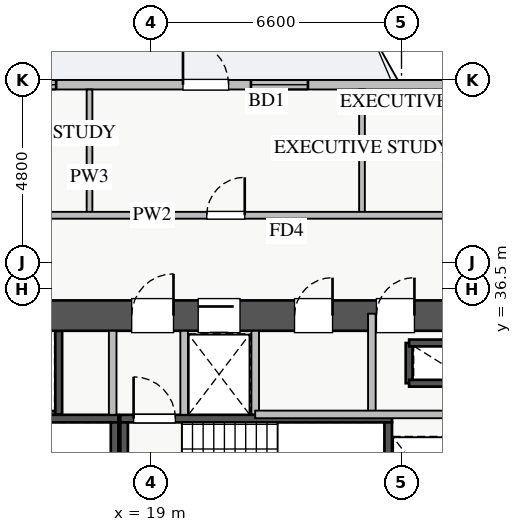
"""IFC4 building model, lengths in metres.
Left out: names, types, materials, properties, quantities, classifications, styles, units other than length and angle.
Written with IfcOpenShell. Run it as: python <this file> out.ifc"""

import sys

from ifc_helpers import new_model, si_unit, direction, frame, frame_2d, origin, place, context, subcontext, project, spatial, rectangle, extrude, source, transform, mapped, element, fill, save


model = new_model("IFC4")
c1 = context("Model", 3, precision=1e-05, world=origin(), true_north=direction((0.0, 1.0)))
c2 = subcontext(c1, "Body", "Model", "MODEL_VIEW")
j1 = project(units=[si_unit("LENGTHUNIT", "METRE"), si_unit("PLANEANGLEUNIT", "RADIAN")], contexts=[c1])
p1 = place(None, origin())
s1 = spatial("IfcSite", under=j1, at=p1, CompositionType="ELEMENT")
p2 = place(p1, origin())
s2 = spatial("IfcBuilding", under=s1, at=p2, CompositionType="ELEMENT")
p3 = place(p2, frame((0.0, 0.0, 36.0)))
s3 = spatial("IfcBuildingStorey", under=s2, at=p3, CompositionType="ELEMENT", Elevation=36.0)
p4 = place(p3, frame((25.8, 34.02, 0.0), z_axis=(0.0, 0.0, 1.0), x_axis=(0.0, 1.0, 0.0)))
e1 = element("IfcWall", 1, at=p4, inside=s3, PredefinedType="SHEAR", context=c2, shape_type="SweptSolid", body=[
    extrude(rectangle(XDim=1.06, YDim=0.18, at=frame_2d((0.53, 0.0))), origin(), (0.0, 0.0, 1.0), 3.07),
])
for number, where, z_axis, x_axis in (
    (2, (25.8, 35.08, 0.0), (0.0, 0.0, 1.0), (1.0, 0.0, 0.0)),
    (3, (25.8, 34.02, 0.0), (0.0, 0.0, 1.0), (1.0, 0.0, 0.0)),
):
    element("IfcWall", number, at=place(p3, frame(where, z_axis=z_axis, x_axis=x_axis)), inside=s3, PredefinedType="SHEAR", context=c2, shape_type="SweptSolid", body=[
        extrude(rectangle(XDim=1.2, YDim=0.18, at=frame_2d((0.6, 0.0))), origin(), (0.0, 0.0, 1.0), 3.07),
    ])
p5 = place(p3, frame((14.62, 33.2, 0.0), z_axis=(0.0, 0.0, 1.0), x_axis=(1.0, 0.0, 0.0)))
e4 = element("IfcWall", 4, at=p5, inside=s3, PredefinedType="SHEAR", context=c2, shape_type="SweptSolid", body=[
    extrude(rectangle(XDim=1.96, YDim=0.18, at=frame_2d((0.98, 0.0))), origin(), (0.0, 0.0, 1.0), 3.07),
])
p6 = place(p3, frame((16.58, 33.2, 0.0), z_axis=(0.0, 0.0, 1.0), x_axis=(0.0, 1.0, 0.0)))
e5 = element("IfcWall", 5, at=p6, inside=s3, PredefinedType="SHEAR", context=c2, shape_type="SweptSolid", body=[
    extrude(rectangle(XDim=2.2, YDim=0.18, at=frame_2d((1.1, 0.0))), origin(), (0.0, 0.0, 1.0), 3.07),
])
p7 = place(p3, frame((19.88, 33.2, 0.0), z_axis=(0.0, 0.0, 1.0), x_axis=(1.0, 0.0, 0.0)))
e6 = element("IfcWall", 6, at=p7, inside=s3, PredefinedType="SHEAR", context=c2, shape_type="SweptSolid", body=[
    extrude(rectangle(XDim=1.87, YDim=0.18, at=frame_2d((0.935, 0.0))), origin(), (0.0, 0.0, 1.0), 3.07),
])
p8 = place(p3, frame((11.0, 33.09, 0.0), z_axis=(0.0, 0.0, 1.0), x_axis=(1.0, 0.0, 0.0)))
e7 = element("IfcWall", 7, at=p8, inside=s3, PredefinedType="SHEAR", context=c2, shape_type="SweptSolid", body=[
    extrude(rectangle(XDim=7.15, YDim=0.2, at=frame_2d((3.575, 0.0))), origin(), (0.0, 0.0, 1.0), 3.25),
])
p9 = place(p8, frame((0.35, 0.0, 0.0)))
e8 = element("IfcOpeningElement", 8, at=p9, cuts=e7, PredefinedType="OPENING", context=c2, shape_type="SweptSolid", body=[
    extrude(rectangle(XDim=1.1, YDim=2.05, at=frame_2d((0.55, 1.025))), frame((0.0, 0.11, 0.0), z_axis=(0.0, -1.0, 0.0), x_axis=(1.0, 0.0, 0.0)), (0.0, 0.0, 1.0), 0.22),
])
p10 = place(p3, frame((18.05, 30.05, 0.0), z_axis=(0.0, 0.0, 1.0), x_axis=(0.0, 1.0, 0.0)))
e9 = element("IfcWall", 9, at=p10, inside=s3, PredefinedType="SHEAR", context=c2, shape_type="SweptSolid", body=[
    extrude(rectangle(XDim=2.94, YDim=0.2, at=frame_2d((1.47, 0.0))), origin(), (0.0, 0.0, 1.0), 3.25),
])
p11 = place(p3, frame((18.2, 33.09, 0.0), z_axis=(0.0, 0.0, 1.0), x_axis=(1.0, 0.0, 0.0)))
e10 = element("IfcWall", 10, at=p11, inside=s3, PredefinedType="SHEAR", context=c2, shape_type="SweptSolid", body=[
    extrude(rectangle(XDim=7.15, YDim=0.2, at=frame_2d((3.575, 0.0))), origin(), (0.0, 0.0, 1.0), 3.25),
])
p12 = place(p11, frame((0.35, 0.0, 0.0)))
e11 = element("IfcOpeningElement", 11, at=p12, cuts=e10, PredefinedType="OPENING", context=c2, shape_type="SweptSolid", body=[
    extrude(rectangle(XDim=1.1, YDim=2.05, at=frame_2d((0.55, 1.025))), frame((0.0, 0.11, 0.0), z_axis=(0.0, -1.0, 0.0), x_axis=(1.0, 0.0, 0.0)), (0.0, 0.0, 1.0), 0.22),
])
for number, where, z_axis, x_axis in (
    (12, (18.3, 30.05, 0.0), (0.0, 0.0, 1.0), (0.0, 1.0, 0.0)),
    (13, (25.25, 30.05, 0.0), (0.0, 0.0, 1.0), (0.0, 1.0, 0.0)),
):
    element("IfcWall", number, at=place(p3, frame(where, z_axis=z_axis, x_axis=x_axis)), inside=s3, PredefinedType="SHEAR", context=c2, shape_type="SweptSolid", body=[
        extrude(rectangle(XDim=2.94, YDim=0.2, at=frame_2d((1.47, 0.0))), origin(), (0.0, 0.0, 1.0), 3.25),
    ])
p13 = place(p3, frame((10.2, 35.8, 0.0), z_axis=(0.0, 0.0, 1.0), x_axis=(1.0, 0.0, 0.0)))
e14 = element("IfcWall", 14, at=p13, inside=s3, PredefinedType="SHEAR", context=c2, shape_type="SweptSolid", body=[
    extrude(rectangle(XDim=17.6, YDim=0.8, at=frame_2d((8.8, 0.0))), origin(), (0.0, 0.0, 1.0), 3.25),
])
p14 = place(p13, frame((1.15, 0.0, 0.0)))
e15 = element("IfcOpeningElement", 15, at=p14, cuts=e14, PredefinedType="OPENING", context=c2, shape_type="SweptSolid", body=[
    extrude(rectangle(XDim=1.1, YDim=2.05, at=frame_2d((0.55, 1.025))), frame((0.0, 0.41, 0.0), z_axis=(0.0, -1.0, 0.0), x_axis=(1.0, 0.0, 0.0)), (0.0, 0.0, 1.0), 0.82),
])
p15 = place(p13, frame((8.3, 0.0, 0.0)))
e16 = element("IfcOpeningElement", 16, at=p15, cuts=e14, PredefinedType="OPENING", context=c2, shape_type="SweptSolid", body=[
    extrude(rectangle(XDim=1.1, YDim=2.05, at=frame_2d((0.55, 1.025))), frame((0.0, 0.41, 0.0), z_axis=(0.0, -1.0, 0.0), x_axis=(1.0, 0.0, 0.0)), (0.0, 0.0, 1.0), 0.82),
])
p16 = place(p13, frame((10.05, 0.0, 0.0)))
e17 = element("IfcOpeningElement", 17, at=p16, cuts=e14, PredefinedType="OPENING", context=c2, shape_type="SweptSolid", body=[
    extrude(rectangle(XDim=1.1, YDim=2.05, at=frame_2d((0.55, 1.025))), frame((0.0, 0.41, 0.0), z_axis=(0.0, -1.0, 0.0), x_axis=(1.0, 0.0, 0.0)), (0.0, 0.0, 1.0), 0.82),
])
p17 = place(p13, frame((14.74, 0.0, 0.0)))
e18 = element("IfcOpeningElement", 18, at=p17, cuts=e14, PredefinedType="OPENING", context=c2, shape_type="SweptSolid", body=[
    extrude(rectangle(XDim=1.0, YDim=2.05, at=frame_2d((0.5, 1.025))), frame((0.0, 0.41, 0.0), z_axis=(0.0, -1.0, 0.0), x_axis=(1.0, 0.0, 0.0)), (0.0, 0.0, 1.0), 0.82),
])
p18 = place(p13, frame((12.585, 0.0, 0.0)))
e19 = element("IfcOpeningElement", 19, at=p18, cuts=e14, PredefinedType="OPENING", context=c2, shape_type="SweptSolid", body=[
    extrude(rectangle(XDim=1.0, YDim=2.05, at=frame_2d((0.5, 1.025))), frame((0.0, 0.41, 0.0), z_axis=(0.0, -1.0, 0.0), x_axis=(1.0, 0.0, 0.0)), (0.0, 0.0, 1.0), 0.82),
])
p19 = place(p3, frame((5.45, 41.875, 0.0), z_axis=(0.0, 0.0, 1.0), x_axis=(1.0, 0.0, 0.0)))
e20 = element("IfcWall", 20, at=p19, inside=s3, PredefinedType="STANDARD", context=c2, shape_type="SweptSolid", body=[
    extrude(rectangle(XDim=27.1, YDim=0.25, at=frame_2d((13.55, 0.0))), origin(), (0.0, 0.0, 1.0), 2.61),
])
p20 = place(p19, frame((14.4, 0.0, 0.0)))
e21 = element("IfcOpeningElement", 21, at=p20, cuts=e20, PredefinedType="OPENING", context=c2, shape_type="SweptSolid", body=[
    extrude(rectangle(XDim=1.2, YDim=2.1, at=frame_2d((0.6, 1.05))), frame((0.0, 0.135, 0.0), z_axis=(0.0, -1.0, 0.0), x_axis=(1.0, 0.0, 0.0)), (0.0, 0.0, 1.0), 0.27),
])
p21 = place(p19, frame((1.365, 0.0, 0.9)))
e22 = element("IfcOpeningElement", 22, at=p21, cuts=e20, PredefinedType="OPENING", context=c2, shape_type="SweptSolid", body=[
    extrude(rectangle(XDim=1.8, YDim=1.5, at=frame_2d((0.9, 0.75))), frame((0.0, 0.135, 0.0), z_axis=(0.0, -1.0, 0.0), x_axis=(1.0, 0.0, 0.0)), (0.0, 0.0, 1.0), 0.27),
])
p22 = place(p19, frame((9.263, 0.0, 0.9)))
e23 = element("IfcOpeningElement", 23, at=p22, cuts=e20, PredefinedType="OPENING", context=c2, shape_type="SweptSolid", body=[
    extrude(rectangle(XDim=1.8, YDim=1.45, at=frame_2d((0.9, 0.725))), frame((0.0, 0.135, 0.0), z_axis=(0.0, -1.0, 0.0), x_axis=(1.0, 0.0, 0.0)), (0.0, 0.0, 1.0), 0.27),
])
p23 = place(p19, frame((16.188, 0.0, 0.9)))
e24 = element("IfcOpeningElement", 24, at=p23, cuts=e20, PredefinedType="OPENING", context=c2, shape_type="SweptSolid", body=[
    extrude(rectangle(XDim=1.5, YDim=1.45, at=frame_2d((0.75, 0.725))), frame((0.0, 0.135, 0.0), z_axis=(0.0, -1.0, 0.0), x_axis=(1.0, 0.0, 0.0)), (0.0, 0.0, 1.0), 0.27),
])
p24 = place(p19, frame((22.663, 0.0, 0.9)))
e25 = element("IfcOpeningElement", 25, at=p24, cuts=e20, PredefinedType="OPENING", context=c2, shape_type="SweptSolid", body=[
    extrude(rectangle(XDim=2.1, YDim=1.48, at=frame_2d((1.05, 0.74))), frame((0.0, 0.135, 0.0), z_axis=(0.0, -1.0, 0.0), x_axis=(1.0, 0.0, 0.0)), (0.0, 0.0, 1.0), 0.27),
])
p25 = place(p19, frame((5.149, 0.0, 0.9)))
e26 = element("IfcOpeningElement", 26, at=p25, cuts=e20, PredefinedType="OPENING", context=c2, shape_type="SweptSolid", body=[
    extrude(rectangle(XDim=2.4, YDim=1.5, at=frame_2d((1.2, 0.75))), frame((0.0, 0.135, 0.0), z_axis=(0.0, -1.0, 0.0), x_axis=(1.0, 0.0, 0.0)), (0.0, 0.0, 1.0), 0.27),
])
for number, where, z_axis, x_axis in (
    (27, (18.0, 33.19, 0.0), (0.0, 0.0, 1.0), (0.0, 1.0, 0.0)),
    (28, (19.88, 33.19, 0.0), (0.0, 0.0, 1.0), (0.0, 1.0, 0.0)),
):
    element("IfcWall", number, at=place(p3, frame(where, z_axis=z_axis, x_axis=x_axis)), inside=s3, PredefinedType="PARTITIONING", context=c2, shape_type="SweptSolid", body=[
        extrude(rectangle(XDim=2.21, YDim=0.2, at=frame_2d((1.105, 0.0))), origin(), (0.0, 0.0, 1.0), 3.07),
    ])
p26 = place(p3, frame((24.82, 33.2, 0.0), z_axis=(0.0, 0.0, 1.0), x_axis=(0.0, 1.0, 0.0)))
e29 = element("IfcWall", 29, at=p26, inside=s3, PredefinedType="PARTITIONING", context=c2, shape_type="SweptSolid", body=[
    extrude(rectangle(XDim=2.65, YDim=0.2, at=frame_2d((1.325, 0.0))), origin(), (0.0, 0.0, 1.0), 3.07),
])
p27 = place(p3, frame((21.75, 33.2, 0.0), z_axis=(0.0, 0.0, 1.0), x_axis=(0.0, 1.0, 0.0)))
e30 = element("IfcWall", 30, at=p27, inside=s3, PredefinedType="PARTITIONING", context=c2, shape_type="SweptSolid", body=[
    extrude(rectangle(XDim=2.2, YDim=0.2, at=frame_2d((1.1, 0.0))), origin(), (0.0, 0.0, 1.0), 3.07),
])
p28 = place(p3, frame((21.75, 33.2, 0.0), z_axis=(0.0, 0.0, 1.0), x_axis=(1.0, 0.0, 0.0)))
e31 = element("IfcWall", 31, at=p28, inside=s3, PredefinedType="PARTITIONING", context=c2, shape_type="SweptSolid", body=[
    extrude(rectangle(XDim=5.17, YDim=0.2, at=frame_2d((2.585, 0.0))), origin(), (0.0, 0.0, 1.0), 3.07),
])
for number, where, z_axis, x_axis in (
    (32, (17.39, 38.44, 0.0), (0.0, 0.0, 1.0), (0.0, 1.0, 0.0)),
    (33, (24.56, 38.44, 0.0), (0.0, 0.0, 1.0), (0.0, 1.0, 0.0)),
):
    element("IfcWall", number, at=place(p3, frame(where, z_axis=z_axis, x_axis=x_axis)), inside=s3, PredefinedType="PARTITIONING", context=c2, shape_type="SweptSolid", body=[
        extrude(rectangle(XDim=3.31, YDim=0.15, at=frame_2d((1.655, 0.0))), origin(), (0.0, 0.0, 1.0), 3.07),
    ])
p29 = place(p3, frame((8.85, 38.44, 0.0), z_axis=(0.0, 0.0, 1.0), x_axis=(1.0, 0.0, 0.0)))
e34 = element("IfcWall", 34, at=p29, inside=s3, PredefinedType="PARTITIONING", context=c2, shape_type="SweptSolid", body=[
    extrude(rectangle(XDim=23.57, YDim=0.18, at=frame_2d((11.785, 0.0))), origin(), (0.0, 0.0, 1.0), 3.07),
])
p30 = place(p29, frame((3.77, 0.0, 0.0)))
e35 = element("IfcOpeningElement", 35, at=p30, cuts=e34, PredefinedType="OPENING", context=c2, shape_type="SweptSolid", body=[
    extrude(rectangle(XDim=1.0, YDim=2.05, at=frame_2d((0.5, 1.025))), frame((0.0, 0.1, 0.0), z_axis=(0.0, -1.0, 0.0), x_axis=(1.0, 0.0, 0.0)), (0.0, 0.0, 1.0), 0.2),
])
p31 = place(p29, frame((11.625, 0.0, 0.0)))
e36 = element("IfcOpeningElement", 36, at=p31, cuts=e34, PredefinedType="OPENING", context=c2, shape_type="SweptSolid", body=[
    extrude(rectangle(XDim=1.0, YDim=2.05, at=frame_2d((0.5, 1.025))), frame((0.0, 0.1, 0.0), z_axis=(0.0, -1.0, 0.0), x_axis=(1.0, 0.0, 0.0)), (0.0, 0.0, 1.0), 0.2),
])
p32 = place(p29, frame((19.14, 0.0, 0.0)))
e37 = element("IfcOpeningElement", 37, at=p32, cuts=e34, PredefinedType="OPENING", context=c2, shape_type="SweptSolid", body=[
    extrude(rectangle(XDim=1.0, YDim=2.05, at=frame_2d((0.5, 1.025))), frame((0.0, 0.1, 0.0), z_axis=(0.0, -1.0, 0.0), x_axis=(1.0, 0.0, 0.0)), (0.0, 0.0, 1.0), 0.2),
])
m1 = source(origin(), c2, "Body", "SweptSolid", [
    extrude(rectangle(XDim=1.2, YDim=2.1, at=frame_2d((0.6, 1.05))), frame((0.0, 0.025, 0.0), z_axis=(0.0, -1.0, 0.0), x_axis=(1.0, 0.0, 0.0)), (0.0, 0.0, 1.0), 0.05),
])
p33 = place(p20, origin())
e38 = element("IfcDoor", 38, at=p33, inside=s3, OperationType="SINGLE_SWING_LEFT", PredefinedType="DOOR", context=c2, shape_type="MappedRepresentation", body=[
    mapped(m1, transform((0.0, 0.0, 0.0), x_axis=(1.0, 0.0, 0.0), y_axis=(0.0, 1.0, 0.0), z_axis=(0.0, 0.0, 1.0), scale=1.0)),
])
fill(e21, e38)
m2 = source(origin(), c2, "Body", "SweptSolid", [
    extrude(rectangle(XDim=1.8, YDim=1.45, at=frame_2d((0.9, 0.725))), frame((0.0, 0.03, 0.0), z_axis=(0.0, -1.0, 0.0), x_axis=(1.0, 0.0, 0.0)), (0.0, 0.0, 1.0), 0.06),
])
p34 = place(p22, origin())
e39 = element("IfcWindow", 39, at=p34, inside=s3, PartitioningType="DOUBLE_PANEL_VERTICAL", PredefinedType="WINDOW", context=c2, shape_type="MappedRepresentation", body=[
    mapped(m2, transform((0.0, 0.0, 0.0), x_axis=(1.0, 0.0, 0.0), y_axis=(0.0, 1.0, 0.0), z_axis=(0.0, 0.0, 1.0), scale=1.0)),
])
fill(e23, e39)
m3 = source(origin(), c2, "Body", "SweptSolid", [
    extrude(rectangle(XDim=1.5, YDim=1.45, at=frame_2d((0.75, 0.725))), frame((0.0, 0.03, 0.0), z_axis=(0.0, -1.0, 0.0), x_axis=(1.0, 0.0, 0.0)), (0.0, 0.0, 1.0), 0.06),
])
p35 = place(p23, origin())
e40 = element("IfcWindow", 40, at=p35, inside=s3, PartitioningType="DOUBLE_PANEL_VERTICAL", PredefinedType="WINDOW", context=c2, shape_type="MappedRepresentation", body=[
    mapped(m3, transform((0.0, 0.0, 0.0), x_axis=(1.0, 0.0, 0.0), y_axis=(0.0, 1.0, 0.0), z_axis=(0.0, 0.0, 1.0), scale=1.0)),
])
fill(e24, e40)
m4 = source(origin(), c2, "Body", "SweptSolid", [
    extrude(rectangle(XDim=1.1, YDim=2.05, at=frame_2d((0.55, 1.025))), frame((0.0, 0.025, 0.0), z_axis=(0.0, -1.0, 0.0), x_axis=(1.0, 0.0, 0.0)), (0.0, 0.0, 1.0), 0.05),
])
p36 = place(p15, origin())
e41 = element("IfcDoor", 41, at=p36, inside=s3, OperationType="SINGLE_SWING_RIGHT", PredefinedType="DOOR", context=c2, shape_type="MappedRepresentation", body=[
    mapped(m4, transform((0.0, 0.0, 0.0), x_axis=(1.0, 0.0, 0.0), y_axis=(0.0, 1.0, 0.0), z_axis=(0.0, 0.0, 1.0), scale=1.0)),
])
fill(e16, e41)
p37 = place(p12, origin())
e42 = element("IfcDoor", 42, at=p37, inside=s3, OperationType="SINGLE_SWING_LEFT", PredefinedType="DOOR", context=c2, shape_type="MappedRepresentation", body=[
    mapped(m4, transform((0.0, 0.0, 0.0), x_axis=(1.0, 0.0, 0.0), y_axis=(0.0, 1.0, 0.0), z_axis=(0.0, 0.0, 1.0), scale=1.0)),
])
fill(e11, e42)
p38 = place(p16, origin())
e43 = element("IfcDoor", 43, at=p38, inside=s3, OperationType="SLIDING_TO_LEFT", PredefinedType="DOOR", context=c2, shape_type="MappedRepresentation", body=[
    mapped(m4, transform((0.0, 0.0, 0.0), x_axis=(1.0, 0.0, 0.0), y_axis=(0.0, 1.0, 0.0), z_axis=(0.0, 0.0, 1.0), scale=1.0)),
])
fill(e17, e43)
m5 = source(origin(), c2, "Body", "SweptSolid", [
    extrude(rectangle(XDim=1.0, YDim=2.05, at=frame_2d((0.5, 1.025))), frame((0.0, 0.025, 0.0), z_axis=(0.0, -1.0, 0.0), x_axis=(1.0, 0.0, 0.0)), (0.0, 0.0, 1.0), 0.05),
])
p39 = place(p17, origin())
e44 = element("IfcDoor", 44, at=p39, inside=s3, OperationType="SINGLE_SWING_RIGHT", PredefinedType="DOOR", context=c2, shape_type="MappedRepresentation", body=[
    mapped(m5, transform((0.0, 0.0, 0.0), x_axis=(1.0, 0.0, 0.0), y_axis=(0.0, 1.0, 0.0), z_axis=(0.0, 0.0, 1.0), scale=1.0)),
])
fill(e18, e44)
p40 = place(p18, origin())
e45 = element("IfcDoor", 45, at=p40, inside=s3, OperationType="SINGLE_SWING_RIGHT", PredefinedType="DOOR", context=c2, shape_type="MappedRepresentation", body=[
    mapped(m5, transform((0.0, 0.0, 0.0), x_axis=(1.0, 0.0, 0.0), y_axis=(0.0, 1.0, 0.0), z_axis=(0.0, 0.0, 1.0), scale=1.0)),
])
fill(e19, e45)
p41 = place(p31, origin())
e46 = element("IfcDoor", 46, at=p41, inside=s3, OperationType="SINGLE_SWING_RIGHT", PredefinedType="DOOR", context=c2, shape_type="MappedRepresentation", body=[
    mapped(m5, transform((0.0, 0.0, 0.0), x_axis=(1.0, 0.0, 0.0), y_axis=(0.0, 1.0, 0.0), z_axis=(0.0, 0.0, 1.0), scale=1.0)),
])
fill(e36, e46)
save(model, sys.argv[1])
